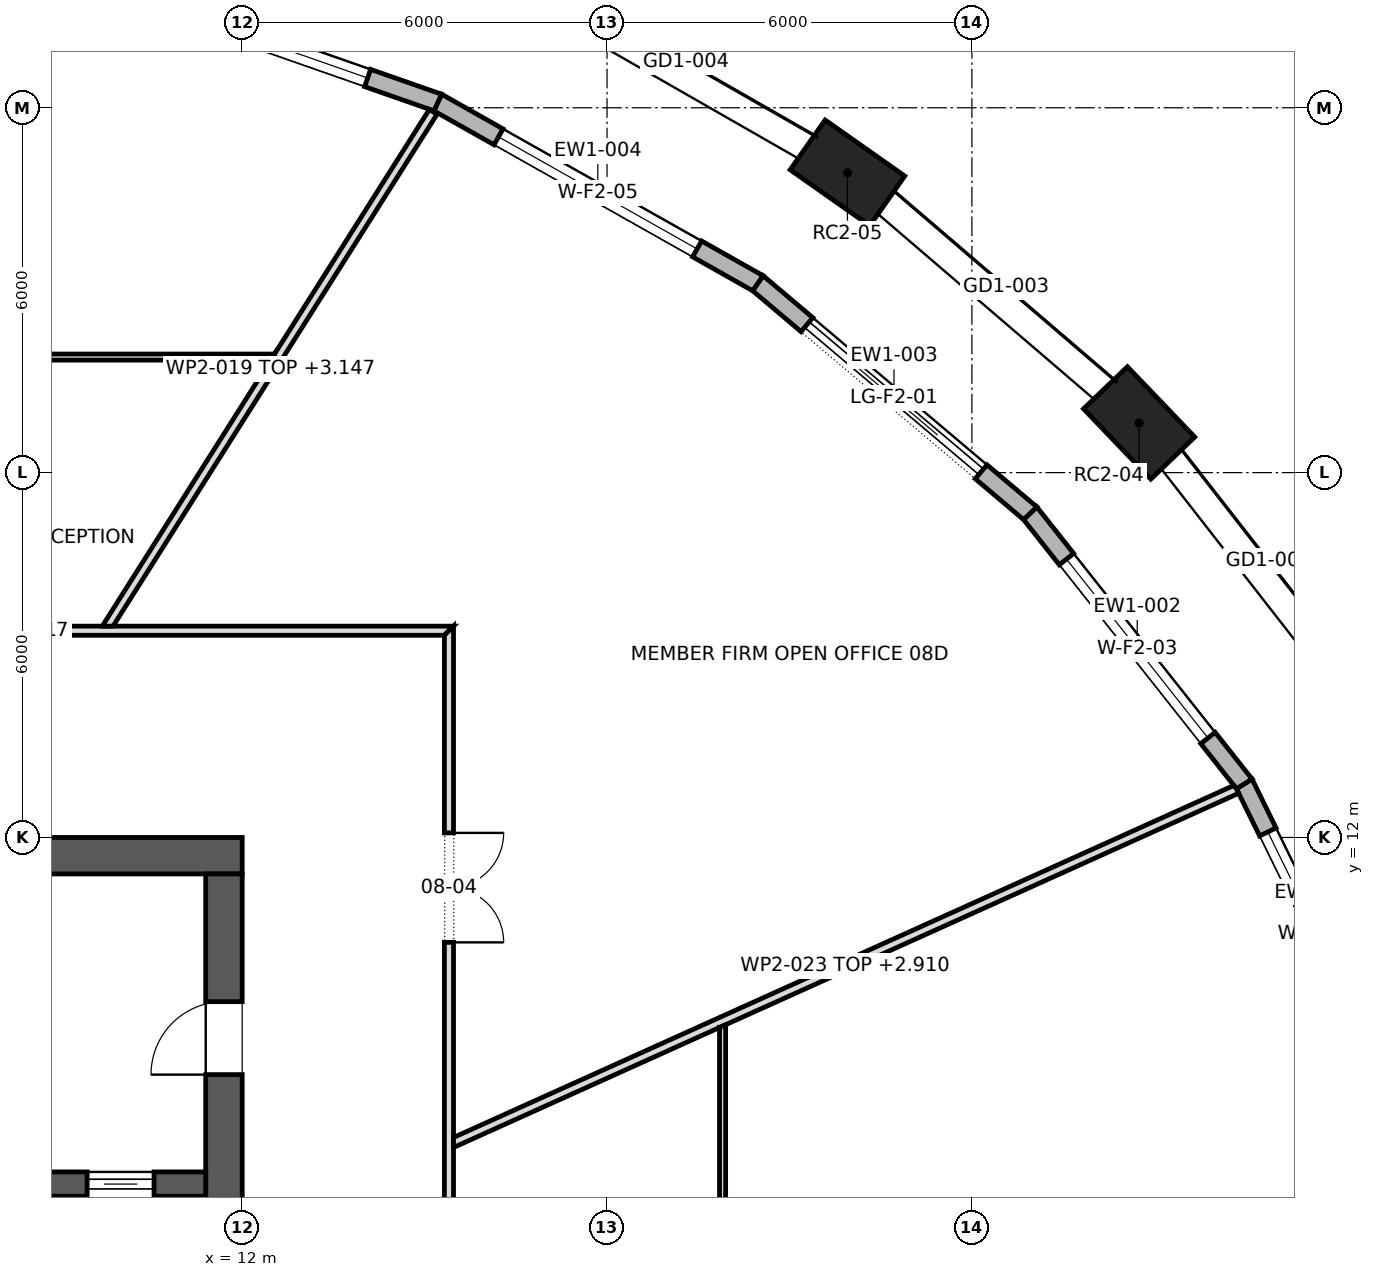
"""IFC4 building model, lengths in metres.
Left out: names, types, materials, properties, quantities, classifications, styles, units other than length and angle.
Written with IfcOpenShell. Run it as: python <this file> out.ifc"""

import sys

from ifc_helpers import new_model, si_unit, direction, frame, frame_2d, origin, origin_2d, place, context, subcontext, project, spatial, polyline, rectangle, outline, extrude, element, fill, save


model = new_model("IFC4")
c1 = context("Model", 3, precision=1e-05, world=origin(), true_north=direction((0.0, 1.0)))
c2 = subcontext(c1, "Body", "Model", "MODEL_VIEW")
j1 = project(units=[si_unit("LENGTHUNIT", "METRE"), si_unit("PLANEANGLEUNIT", "RADIAN")], contexts=[c1])
p1 = place(None, origin())
s1 = spatial("IfcSite", under=j1, at=p1, CompositionType="ELEMENT")
p2 = place(p1, origin())
s2 = spatial("IfcBuilding", under=s1, at=p2, CompositionType="ELEMENT")
p3 = place(p2, frame((0.0, 0.0, 125.5)))
s3 = spatial("IfcBuildingStorey", under=s2, at=p3, CompositionType="ELEMENT", Elevation=125.5)
for number, where, z_axis, x_axis in (
    (1, (26.75, 18.817, 0.0), (0.0, 0.0, 1.0), (-0.692, 0.722, 0.0)),
    (2, (21.953, 22.929, 0.0), (0.0, 0.0, 1.0), (-0.818, 0.575, 0.0)),
):
    element("IfcColumn", number, at=place(p3, frame(where, z_axis=z_axis, x_axis=x_axis)), inside=s3, PredefinedType="COLUMN", context=c2, shape_type="SweptSolid", body=[
        extrude(rectangle(XDim=1.6, YDim=1.0, at=origin_2d()), origin(), (0.0, 0.0, 1.0), 4.2),
    ])
p4 = place(p3, frame((-12.0, 11.7, 0.0), z_axis=(0.0, 0.0, 1.0), x_axis=(1.0, 0.0, 0.0)))
e3 = element("IfcWall", 3, at=p4, inside=s3, PredefinedType="SHEAR", context=c2, shape_type="SweptSolid", body=[
    extrude(rectangle(XDim=24.0, YDim=0.6, at=frame_2d((12.0, 0.0))), origin(), (0.0, 0.0, 1.0), 4.2),
])
p5 = place(p4, frame((9.225, 0.0, 0.0)))
e4 = element("IfcOpeningElement", 4, at=p5, cuts=e3, PredefinedType="OPENING", context=c2, shape_type="SweptSolid", body=[
    extrude(rectangle(XDim=0.9, YDim=2.1, at=frame_2d((0.45, 1.05))), frame((0.0, 0.312, 0.0), z_axis=(0.0, -1.0, 0.0), x_axis=(1.0, 0.0, 0.0)), (0.0, 0.0, 1.0), 0.624),
])
p6 = place(p4, frame((10.925, 0.0, 0.0)))
e5 = element("IfcOpeningElement", 5, at=p6, cuts=e3, PredefinedType="OPENING", context=c2, shape_type="SweptSolid", body=[
    extrude(rectangle(XDim=0.8, YDim=2.1, at=frame_2d((0.4, 1.05))), frame((0.0, 0.312, 0.0), z_axis=(0.0, -1.0, 0.0), x_axis=(1.0, 0.0, 0.0)), (0.0, 0.0, 1.0), 0.624),
])
p7 = place(p4, frame((4.2, 0.0, 0.0)))
e6 = element("IfcOpeningElement", 6, at=p7, cuts=e3, PredefinedType="OPENING", context=c2, shape_type="SweptSolid", body=[
    extrude(rectangle(XDim=0.8, YDim=2.1, at=frame_2d((0.4, 1.05))), frame((0.0, 0.312, 0.0), z_axis=(0.0, -1.0, 0.0), x_axis=(1.0, 0.0, 0.0)), (0.0, 0.0, 1.0), 0.624),
])
p8 = place(p4, frame((13.8, 0.0, 0.0)))
e7 = element("IfcOpeningElement", 7, at=p8, cuts=e3, PredefinedType="OPENING", context=c2, shape_type="SweptSolid", body=[
    extrude(rectangle(XDim=0.8, YDim=2.1, at=frame_2d((0.4, 1.05))), frame((0.0, 0.312, 0.0), z_axis=(0.0, -1.0, 0.0), x_axis=(1.0, 0.0, 0.0)), (0.0, 0.0, 1.0), 0.624),
])
p9 = place(p4, frame((16.6, 0.0, 0.0)))
e8 = element("IfcOpeningElement", 8, at=p9, cuts=e3, PredefinedType="OPENING", context=c2, shape_type="SweptSolid", body=[
    extrude(rectangle(XDim=0.8, YDim=2.1, at=frame_2d((0.4, 1.05))), frame((0.0, 0.312, 0.0), z_axis=(0.0, -1.0, 0.0), x_axis=(1.0, 0.0, 0.0)), (0.0, 0.0, 1.0), 0.624),
])
p10 = place(p3, frame((11.7, -11.4, 0.0), z_axis=(0.0, 0.0, 1.0), x_axis=(0.0, 1.0, 0.0)))
e9 = element("IfcWall", 9, at=p10, inside=s3, PredefinedType="SHEAR", context=c2, shape_type="SweptSolid", body=[
    extrude(rectangle(XDim=22.8, YDim=0.6, at=frame_2d((11.4, 0.0))), origin(), (0.0, 0.0, 1.0), 4.2),
])
p11 = place(p10, frame((10.2, 0.0, 0.0)))
e10 = element("IfcOpeningElement", 10, at=p11, cuts=e9, PredefinedType="OPENING", context=c2, shape_type="SweptSolid", body=[
    extrude(rectangle(XDim=2.4, YDim=2.1, at=frame_2d((1.2, 1.05))), frame((0.0, 0.312, 0.0), z_axis=(0.0, -1.0, 0.0), x_axis=(1.0, 0.0, 0.0)), (0.0, 0.0, 1.0), 0.624),
])
p12 = place(p10, frame((19.5, 0.0, 0.0)))
e11 = element("IfcOpeningElement", 11, at=p12, cuts=e9, PredefinedType="OPENING", context=c2, shape_type="SweptSolid", body=[
    extrude(rectangle(XDim=1.2, YDim=2.1, at=frame_2d((0.6, 1.05))), frame((0.0, 0.312, 0.0), z_axis=(0.0, -1.0, 0.0), x_axis=(1.0, 0.0, 0.0)), (0.0, 0.0, 1.0), 0.624),
])
p13 = place(p10, frame((2.1, 0.0, 0.0)))
e12 = element("IfcOpeningElement", 12, at=p13, cuts=e9, PredefinedType="OPENING", context=c2, shape_type="SweptSolid", body=[
    extrude(rectangle(XDim=1.2, YDim=2.1, at=frame_2d((0.6, 1.05))), frame((0.0, 0.312, 0.0), z_axis=(0.0, -1.0, 0.0), x_axis=(1.0, 0.0, 0.0)), (0.0, 0.0, 1.0), 0.624),
])
p14 = place(p3, frame((-11.4, 6.3, 0.0), z_axis=(0.0, 0.0, 1.0), x_axis=(1.0, 0.0, 0.0)))
e13 = element("IfcWall", 13, at=p14, inside=s3, PredefinedType="SHEAR", context=c2, shape_type="SweptSolid", body=[
    extrude(rectangle(XDim=22.8, YDim=0.4, at=frame_2d((11.4, 0.0))), origin(), (0.0, 0.0, 1.0), 4.2),
])
p15 = place(p14, frame((20.85, 0.0, 0.0)))
e14 = element("IfcOpeningElement", 14, at=p15, cuts=e13, PredefinedType="OPENING", context=c2, shape_type="SweptSolid", body=[
    extrude(rectangle(XDim=1.1, YDim=2.1, at=frame_2d((0.55, 1.05))), frame((0.0, 0.212, 0.0), z_axis=(0.0, -1.0, 0.0), x_axis=(1.0, 0.0, 0.0)), (0.0, 0.0, 1.0), 0.424),
])
p16 = place(p3, frame((8.75, 3.2, 0.0), z_axis=(0.0, 0.0, 1.0), x_axis=(0.0, 1.0, 0.0)))
e15 = element("IfcWall", 15, at=p16, inside=s3, PredefinedType="SHEAR", context=c2, shape_type="SweptSolid", body=[
    extrude(rectangle(XDim=2.9, YDim=0.3, at=frame_2d((1.45, 0.0))), origin(), (0.0, 0.0, 1.0), 4.2),
])
p17 = place(p3, frame((30.905, 7.934, 0.0), z_axis=(0.0, 0.0, 1.0), x_axis=(-0.440306401535, 0.897847577692, 0.0)))
e16 = element("IfcWall", 16, at=p17, inside=s3, PredefinedType="STANDARD", context=c2, shape_type="SweptSolid", body=[
    extrude(outline(polyline([(-0.017, -0.15), (5.527, -0.15), (5.494, 0.15), (0.017, 0.15), (-0.017, -0.15)])), origin(), (0.0, 0.0, 1.0), 3.9),
])
p18 = place(p17, frame((0.88, 0.0, 0.6)))
e17 = element("IfcOpeningElement", 17, at=p18, cuts=e16, PredefinedType="OPENING", context=c2, shape_type="SweptSolid", body=[
    extrude(rectangle(XDim=3.75, YDim=2.85, at=frame_2d((1.875, 1.425))), frame((0.0, 0.162, 0.0), z_axis=(0.0, -1.0, 0.0), x_axis=(1.0, 0.0, 0.0)), (0.0, 0.0, 1.0), 0.324),
])
p19 = place(p3, frame((28.479, 12.881, 0.0), z_axis=(0.0, 0.0, 1.0), x_axis=(-0.62038332391, 0.784298751379, 0.0)))
e18 = element("IfcWall", 18, at=p19, inside=s3, PredefinedType="STANDARD", context=c2, shape_type="SweptSolid", body=[
    extrude(outline(polyline([(-0.016, -0.15), (5.69, -0.15), (5.66, 0.15), (0.016, 0.15), (-0.016, -0.15)])), origin(), (0.0, 0.0, 1.0), 3.9),
])
p20 = place(p19, frame((0.962, 0.0, 0.6)))
e19 = element("IfcOpeningElement", 19, at=p20, cuts=e18, PredefinedType="OPENING", context=c2, shape_type="SweptSolid", body=[
    extrude(rectangle(XDim=3.75, YDim=2.85, at=frame_2d((1.875, 1.425))), frame((0.0, 0.162, 0.0), z_axis=(0.0, -1.0, 0.0), x_axis=(1.0, 0.0, 0.0)), (0.0, 0.0, 1.0), 0.324),
])
p21 = place(p3, frame((24.958, 17.332, 0.0), z_axis=(0.0, 0.0, 1.0), x_axis=(-0.763937302001, 0.645290476151, 0.0)))
e20 = element("IfcWall", 20, at=p21, inside=s3, PredefinedType="STANDARD", context=c2, shape_type="SweptSolid", body=[
    extrude(outline(polyline([(-0.015, -0.15), (5.876, -0.15), (5.848, 0.15), (0.015, 0.15), (-0.015, -0.15)])), origin(), (0.0, 0.0, 1.0), 3.9),
])
p22 = place(p21, frame((1.056, 0.0, 0.0)))
e21 = element("IfcOpeningElement", 21, at=p22, cuts=e20, PredefinedType="OPENING", context=c2, shape_type="SweptSolid", body=[
    extrude(rectangle(XDim=3.75, YDim=3.45, at=frame_2d((1.875, 1.725))), frame((0.0, 0.162, 0.0), z_axis=(0.0, -1.0, 0.0), x_axis=(1.0, 0.0, 0.0)), (0.0, 0.0, 1.0), 0.324),
])
p23 = place(p3, frame((20.48, 21.115, 0.0), z_axis=(0.0, 0.0, 1.0), x_axis=(-0.870858332497, 0.491534093142, 0.0)))
e22 = element("IfcWall", 22, at=p23, inside=s3, PredefinedType="STANDARD", context=c2, shape_type="SweptSolid", body=[
    extrude(outline(polyline([(-0.014, -0.15), (6.058, -0.15), (6.031, 0.15), (0.014, 0.15), (-0.014, -0.15)])), origin(), (0.0, 0.0, 1.0), 3.9),
])
p24 = place(p23, frame((1.147, 0.0, 0.6)))
e23 = element("IfcOpeningElement", 23, at=p24, cuts=e22, PredefinedType="OPENING", context=c2, shape_type="SweptSolid", body=[
    extrude(rectangle(XDim=3.75, YDim=2.85, at=frame_2d((1.875, 1.425))), frame((0.0, 0.162, 0.0), z_axis=(0.0, -1.0, 0.0), x_axis=(1.0, 0.0, 0.0)), (0.0, 0.0, 1.0), 0.324),
])
p25 = place(p3, frame((15.216, 24.086, 0.0), z_axis=(0.0, 0.0, 1.0), x_axis=(-0.94389706045, 0.330239820849, 0.0)))
e24 = element("IfcWall", 24, at=p25, inside=s3, PredefinedType="STANDARD", context=c2, shape_type="SweptSolid", body=[
    extrude(outline(polyline([(-0.013, -0.15), (6.207, -0.15), (6.182, 0.15), (0.013, 0.15), (-0.013, -0.15)])), origin(), (0.0, 0.0, 1.0), 3.9),
])
p26 = place(p25, frame((1.222, 0.0, 0.6)))
e25 = element("IfcOpeningElement", 25, at=p26, cuts=e24, PredefinedType="OPENING", context=c2, shape_type="SweptSolid", body=[
    extrude(rectangle(XDim=3.75, YDim=2.85, at=frame_2d((1.875, 1.425))), frame((0.0, 0.162, 0.0), z_axis=(0.0, -1.0, 0.0), x_axis=(1.0, 0.0, 0.0)), (0.0, 0.0, 1.0), 0.324),
])
p27 = place(p3, frame((-2.255, 19.9, 0.0), z_axis=(0.0, 0.0, 1.0), x_axis=(1.0, 0.0, 0.0)))
e26 = element("IfcWall", 26, at=p27, inside=s3, PredefinedType="PARTITIONING", context=c2, shape_type="SweptSolid", body=[
    extrude(outline(polyline([(0.011, -0.05), (1.479, -0.05), (2.947, -0.05), (4.415, -0.05), (4.415, -0.05), (4.515, -0.05), (4.515, -0.05), (6.216, -0.05), (7.917, -0.05), (9.619, -0.05), (11.32, -0.05), (13.021, -0.05), (14.723, -0.05), (14.775, 0.032), (14.775, 0.032), (14.786, 0.05), (14.786, 0.05), (12.938, 0.05), (11.089, 0.05), (9.241, 0.05), (7.393, 0.05), (5.545, 0.05), (3.697, 0.05), (1.848, 0.05), (0.0, 0.05), (0.0, 0.048), (0.011, -0.05)])), origin(), (0.0, 0.0, 1.0), 3.9),
])
p28 = place(p27, frame((9.205, 0.0, 0.0)))
e27 = element("IfcOpeningElement", 27, at=p28, cuts=e26, PredefinedType="OPENING", context=c2, shape_type="SweptSolid", body=[
    extrude(rectangle(XDim=0.9, YDim=2.1, at=frame_2d((0.45, 1.05))), frame((0.0, 0.062, 0.0), z_axis=(0.0, -1.0, 0.0), x_axis=(1.0, 0.0, 0.0)), (0.0, 0.0, 1.0), 0.124),
])
p29 = place(p3, frame((2.21, 15.4, 0.0), z_axis=(0.0, 0.0, 1.0), x_axis=(1.0, 0.0, 0.0)))
e28 = element("IfcWall", 28, at=p29, inside=s3, PredefinedType="PARTITIONING", context=c2, shape_type="SweptSolid", body=[
    extrude(outline(polyline([(0.0, -0.075), (1.874, -0.075), (3.747, -0.075), (5.621, -0.075), (7.494, -0.075), (9.368, -0.075), (11.241, -0.075), (13.115, -0.075), (13.265, 0.075), (11.37, 0.075), (9.475, 0.075), (7.58, 0.075), (5.685, 0.075), (3.79, 0.075), (1.895, 0.075), (0.0, 0.075), (0.0, -0.075)])), origin(), (0.0, 0.0, 1.0), 3.9),
])
p30 = place(p29, frame((3.265, 0.0, 0.0)))
e29 = element("IfcOpeningElement", 29, at=p30, cuts=e28, PredefinedType="OPENING", context=c2, shape_type="SweptSolid", body=[
    extrude(rectangle(XDim=1.0, YDim=2.1, at=frame_2d((0.5, 1.05))), frame((0.0, 0.087, 0.0), z_axis=(0.0, -1.0, 0.0), x_axis=(1.0, 0.0, 0.0)), (0.0, 0.0, 1.0), 0.174),
])
p31 = place(p3, frame((9.762, 15.435, 0.0), z_axis=(0.0, 0.0, 1.0), x_axis=(0.534830284385, 0.844959506074, 0.0)))
e30 = element("IfcWall", 30, at=p31, inside=s3, PredefinedType="PARTITIONING", context=c2, shape_type="SweptSolid", body=[
    extrude(outline(polyline([(10.057, 0.075), (8.47, 0.075), (6.883, 0.075), (5.295, 0.075), (5.211, 0.022), (5.177, 0.075), (3.452, 0.075), (1.726, 0.075), (0.0, 0.075), (0.0, 0.075), (0.095, -0.075), (2.087, -0.075), (4.08, -0.075), (6.072, -0.075), (8.064, -0.075), (10.057, -0.075), (10.057, 0.075)])), origin(), (0.0, 0.0, 1.0), 3.147),
])
p32 = place(p3, frame((15.4, -15.475, 0.0), z_axis=(0.0, 0.0, 1.0), x_axis=(0.0, 1.0, 0.0)))
e31 = element("IfcWall", 31, at=p32, inside=s3, PredefinedType="PARTITIONING", context=c2, shape_type="SweptSolid", body=[
    extrude(outline(polyline([(0.0, -0.075), (1.935, -0.075), (3.869, -0.075), (5.803, -0.075), (7.738, -0.075), (9.672, -0.075), (11.606, -0.075), (13.541, -0.075), (15.475, -0.075), (17.409, -0.075), (19.344, -0.075), (21.278, -0.075), (23.212, -0.075), (25.147, -0.075), (27.081, -0.075), (29.016, -0.075), (30.95, -0.075), (30.8, 0.075), (28.885, 0.075), (26.969, 0.075), (25.053, 0.075), (23.138, 0.075), (21.222, 0.075), (19.306, 0.075), (17.391, 0.075), (15.475, 0.075), (13.56, 0.075), (11.644, 0.075), (9.728, 0.075), (7.812, 0.075), (5.897, 0.075), (3.981, 0.075), (2.066, 0.075), (0.15, 0.075), (0.0, -0.075)])), origin(), (0.0, 0.0, 1.0), 3.9),
])
p33 = place(p32, frame((8.595, 0.0, 0.0)))
e32 = element("IfcOpeningElement", 32, at=p33, cuts=e31, PredefinedType="OPENING", context=c2, shape_type="SweptSolid", body=[
    extrude(rectangle(XDim=1.8, YDim=2.1, at=frame_2d((0.9, 1.05))), frame((0.0, 0.087, 0.0), z_axis=(0.0, -1.0, 0.0), x_axis=(1.0, 0.0, 0.0)), (0.0, 0.0, 1.0), 0.174),
])
p34 = place(p32, frame((17.81, 0.0, 0.0)))
e33 = element("IfcOpeningElement", 33, at=p34, cuts=e31, PredefinedType="OPENING", context=c2, shape_type="SweptSolid", body=[
    extrude(rectangle(XDim=1.0, YDim=2.1, at=frame_2d((0.5, 1.05))), frame((0.0, 0.087, 0.0), z_axis=(0.0, -1.0, 0.0), x_axis=(1.0, 0.0, 0.0)), (0.0, 0.0, 1.0), 0.174),
])
p35 = place(p32, frame((25.75, 0.0, 0.0)))
e34 = element("IfcOpeningElement", 34, at=p35, cuts=e31, PredefinedType="OPENING", context=c2, shape_type="SweptSolid", body=[
    extrude(rectangle(XDim=1.8, YDim=2.1, at=frame_2d((0.9, 1.05))), frame((0.0, 0.087, 0.0), z_axis=(0.0, -1.0, 0.0), x_axis=(1.0, 0.0, 0.0)), (0.0, 0.0, 1.0), 0.174),
])
p36 = place(p3, frame((15.444, 6.97, 0.0), z_axis=(0.0, 0.0, 1.0), x_axis=(0.911543819319, 0.411202949237, 0.0)))
e35 = element("IfcWall", 35, at=p36, inside=s3, PredefinedType="PARTITIONING", context=c2, shape_type="SweptSolid", body=[
    extrude(outline(polyline([(0.0, -0.075), (1.6, -0.075), (3.2, -0.075), (4.8, -0.075), (4.801, -0.073), (4.805, -0.075), (6.677, -0.075), (8.549, -0.075), (10.421, -0.075), (12.293, -0.075), (14.166, -0.075), (14.166, -0.063), (14.163, 0.007), (14.146, 0.075), (12.386, 0.075), (10.627, 0.075), (8.867, 0.075), (7.107, 0.075), (5.347, 0.075), (3.587, 0.075), (1.828, 0.075), (0.068, 0.075), (0.0, -0.075)])), origin(), (0.0, 0.0, 1.0), 2.91),
])
p37 = place(p3, frame((19.9, 8.92, 0.0), z_axis=(0.0, 0.0, 1.0), x_axis=(0.0, -1.0, 0.0)))
e36 = element("IfcWall", 36, at=p37, inside=s3, PredefinedType="PARTITIONING", context=c2, shape_type="SweptSolid", body=[
    extrude(outline(polyline([(0.045, -0.05), (1.787, -0.05), (3.529, -0.05), (5.271, -0.05), (7.012, -0.05), (8.754, -0.05), (10.496, -0.05), (10.504, 0.048), (10.504, 0.05), (8.754, 0.05), (7.003, 0.05), (5.252, 0.05), (3.501, 0.05), (1.751, 0.05), (0.0, 0.05), (0.0, 0.049), (0.045, -0.05)])), origin(), (0.0, 0.0, 1.0), 3.9),
])
p38 = place(p37, frame((4.81, 0.0, 0.0)))
e37 = element("IfcOpeningElement", 37, at=p38, cuts=e36, PredefinedType="OPENING", context=c2, shape_type="SweptSolid", body=[
    extrude(rectangle(XDim=0.9, YDim=2.1, at=frame_2d((0.45, 1.05))), frame((0.0, 0.062, 0.0), z_axis=(0.0, -1.0, 0.0), x_axis=(1.0, 0.0, 0.0)), (0.0, 0.0, 1.0), 0.124),
])
p39 = place(p18, origin())
e38 = element("IfcWindow", 38, at=p39, inside=s3, PartitioningType="TRIPLE_PANEL_VERTICAL", PredefinedType="WINDOW", context=c2, shape_type="SweptSolid", body=[
    extrude(rectangle(XDim=3.75, YDim=2.85, at=frame_2d((1.875, 1.425))), frame((0.0, 0.03, 0.0), z_axis=(0.0, -1.0, 0.0), x_axis=(1.0, 0.0, 0.0)), (0.0, 0.0, 1.0), 0.06),
])
fill(e17, e38)
p40 = place(p20, origin())
e39 = element("IfcWindow", 39, at=p40, inside=s3, PartitioningType="TRIPLE_PANEL_VERTICAL", PredefinedType="WINDOW", context=c2, shape_type="SweptSolid", body=[
    extrude(rectangle(XDim=3.75, YDim=2.85, at=frame_2d((1.875, 1.425))), frame((0.0, 0.03, 0.0), z_axis=(0.0, -1.0, 0.0), x_axis=(1.0, 0.0, 0.0)), (0.0, 0.0, 1.0), 0.06),
])
fill(e19, e39)
p41 = place(p22, origin())
e40 = element("IfcDoor", 40, at=p41, inside=s3, OperationType="DOUBLE_DOOR_SLIDING", PredefinedType="DOOR", context=c2, shape_type="SweptSolid", body=[
    extrude(rectangle(XDim=3.75, YDim=3.45, at=frame_2d((1.875, 1.725))), frame((0.0, 0.025, 0.0), z_axis=(0.0, -1.0, 0.0), x_axis=(1.0, 0.0, 0.0)), (0.0, 0.0, 1.0), 0.05),
])
fill(e21, e40)
p42 = place(p24, origin())
e41 = element("IfcWindow", 41, at=p42, inside=s3, PartitioningType="TRIPLE_PANEL_VERTICAL", PredefinedType="WINDOW", context=c2, shape_type="SweptSolid", body=[
    extrude(rectangle(XDim=3.75, YDim=2.85, at=frame_2d((1.875, 1.425))), frame((0.0, 0.03, 0.0), z_axis=(0.0, -1.0, 0.0), x_axis=(1.0, 0.0, 0.0)), (0.0, 0.0, 1.0), 0.06),
])
fill(e23, e41)
p43 = place(p26, origin())
e42 = element("IfcWindow", 42, at=p43, inside=s3, PartitioningType="TRIPLE_PANEL_VERTICAL", PredefinedType="WINDOW", context=c2, shape_type="SweptSolid", body=[
    extrude(rectangle(XDim=3.75, YDim=2.85, at=frame_2d((1.875, 1.425))), frame((0.0, 0.03, 0.0), z_axis=(0.0, -1.0, 0.0), x_axis=(1.0, 0.0, 0.0)), (0.0, 0.0, 1.0), 0.06),
])
fill(e25, e42)
p44 = place(p15, origin())
e43 = element("IfcDoor", 43, at=p44, inside=s3, OperationType="SLIDING_TO_LEFT", PredefinedType="DOOR", context=c2, shape_type="SweptSolid", body=[
    extrude(rectangle(XDim=1.1, YDim=2.1, at=frame_2d((0.55, 1.05))), frame((0.0, 0.025, 0.0), z_axis=(0.0, -1.0, 0.0), x_axis=(1.0, 0.0, 0.0)), (0.0, 0.0, 1.0), 0.05),
])
fill(e14, e43)
p45 = place(p12, origin())
e44 = element("IfcDoor", 44, at=p45, inside=s3, OperationType="SINGLE_SWING_RIGHT", PredefinedType="DOOR", context=c2, shape_type="SweptSolid", body=[
    extrude(rectangle(XDim=1.2, YDim=2.1, at=frame_2d((0.6, 1.05))), frame((0.0, 0.025, 0.0), z_axis=(0.0, -1.0, 0.0), x_axis=(1.0, 0.0, 0.0)), (0.0, 0.0, 1.0), 0.05),
])
fill(e11, e44)
p46 = place(p35, frame((1.8, 0.0, 0.0), z_axis=(0.0, 0.0, 1.0), x_axis=(-1.0, 0.0, 0.0)))
e45 = element("IfcDoor", 45, at=p46, inside=s3, OperationType="DOUBLE_DOOR_SINGLE_SWING", PredefinedType="DOOR", context=c2, shape_type="SweptSolid", body=[
    extrude(rectangle(XDim=1.8, YDim=2.1, at=frame_2d((0.9, 1.05))), frame((0.0, 0.025, 0.0), z_axis=(0.0, -1.0, 0.0), x_axis=(1.0, 0.0, 0.0)), (0.0, 0.0, 1.0), 0.05),
])
fill(e34, e45)
save(model, sys.argv[1])
